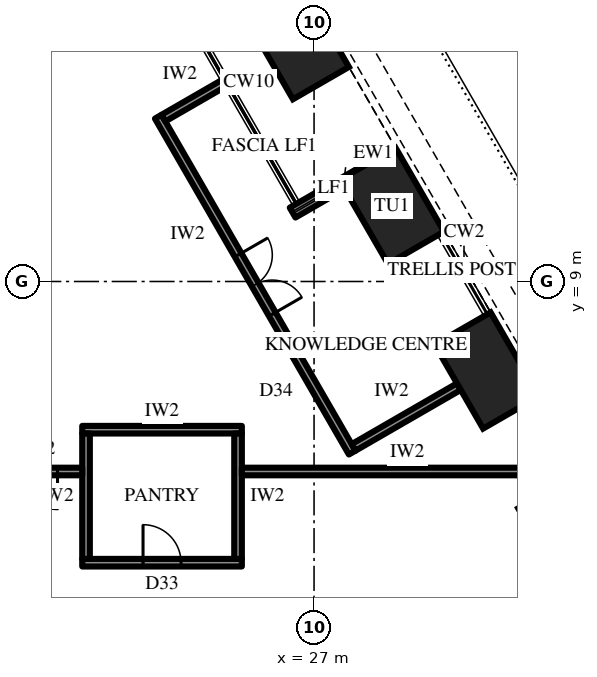
"""IFC4 building model, lengths in metres.
Left out: names, types, materials, properties, quantities, classifications, styles, units other than length and angle.
Written with IfcOpenShell. Run it as: python <this file> out.ifc"""

import sys

from ifc_helpers import new_model, si_unit, direction, frame, frame_2d, origin, origin_2d, place, context, subcontext, project, spatial, rectangle, extrude, element, fill, save


model = new_model("IFC4")
c1 = context("Model", 3, precision=1e-05, world=origin(), true_north=direction((0.0, 1.0)))
c2 = subcontext(c1, "Body", "Model", "MODEL_VIEW")
j1 = project(units=[si_unit("LENGTHUNIT", "METRE"), si_unit("PLANEANGLEUNIT", "RADIAN")], contexts=[c1])
p1 = place(None, origin())
s1 = spatial("IfcSite", under=j1, at=p1, CompositionType="ELEMENT")
p2 = place(p1, origin())
s2 = spatial("IfcBuilding", under=s1, at=p2, CompositionType="ELEMENT")
p3 = place(p2, frame((0.0, 0.0, 119.5)))
s3 = spatial("IfcBuildingStorey", under=s2, at=p3, CompositionType="ELEMENT", Elevation=119.5)
for number, where, z_axis, x_axis in (
    (1, (31.547, 6.658, 0.0), (0.0, 0.0, 1.0), (-0.5, 0.866, 0.0)),
    (2, (29.045, 10.992, 0.0), (0.0, 0.0, 1.0), (-0.5, 0.866, 0.0)),
    (3, (26.544, 15.325, 0.0), (0.0, 0.0, 1.0), (-0.5, 0.866, 0.0)),
):
    element("IfcColumn", number, at=place(p3, frame(where, z_axis=z_axis, x_axis=x_axis)), inside=s3, PredefinedType="COLUMN", context=c2, shape_type="SweptSolid", body=[
        extrude(rectangle(XDim=2.55, YDim=1.7, at=origin_2d()), origin(), (0.0, 0.0, 1.0), 4.2),
    ])
p4 = place(p3, frame((29.12, 12.363, 0.0), z_axis=(0.0, 0.0, 1.0), x_axis=(-0.86602952684, -0.49999285859, 0.0)))
e4 = element("IfcWall", 4, at=p4, inside=s3, PredefinedType="SOLIDWALL", context=c2, shape_type="SweptSolid", body=[
    extrude(rectangle(XDim=3.1, YDim=0.3, at=frame_2d((1.55, 0.0))), origin(), (0.0, 0.0, 1.0), 2.3),
])
p5 = place(p3, frame((28.003, 4.497, 0.0), z_axis=(0.0, 0.0, 1.0), x_axis=(-0.500005407604, 0.86602228168, 0.0)))
e5 = element("IfcWall", 5, at=p5, inside=s3, PredefinedType="PARTITIONING", context=c2, shape_type="SweptSolid", body=[
    extrude(rectangle(XDim=10.208, YDim=0.2, at=frame_2d((5.104, 0.0))), origin(), (0.0, 0.0, 1.0), 4.0),
])
p6 = place(p5, frame((4.204, 0.0, 0.0)))
e6 = element("IfcOpeningElement", 6, at=p6, cuts=e5, PredefinedType="OPENING", context=c2, shape_type="SweptSolid", body=[
    extrude(rectangle(XDim=1.8, YDim=2.4, at=frame_2d((0.9, 1.2))), frame((0.0, 0.11, 0.0), z_axis=(0.0, -1.0, 0.0), x_axis=(1.0, 0.0, 0.0)), (0.0, 0.0, 1.0), 0.22),
])
p7 = place(p3, frame((28.04, 4.633, 0.0), z_axis=(0.0, 0.0, 1.0), x_axis=(0.866008981251, 0.500028443584, 0.0)))
e7 = element("IfcWall", 7, at=p7, inside=s3, PredefinedType="PARTITIONING", context=c2, shape_type="SweptSolid", body=[
    extrude(rectangle(XDim=3.2, YDim=0.2, at=frame_2d((1.6, 0.0))), origin(), (0.0, 0.0, 1.0), 3.082),
])
p8 = place(p3, frame((23.036, 13.3, 0.0), z_axis=(0.0, 0.0, 1.0), x_axis=(0.866029456041, 0.49999298122, 0.0)))
e8 = element("IfcWall", 8, at=p8, inside=s3, PredefinedType="PARTITIONING", context=c2, shape_type="SweptSolid", body=[
    extrude(rectangle(XDim=1.901, YDim=0.2, at=frame_2d((0.95, 0.0))), origin(), (0.0, 0.0, 1.0), 4.0),
])
p9 = place(p3, frame((20.9, 1.6, 0.0), z_axis=(0.0, 0.0, 1.0), x_axis=(1.0, 0.0, 0.0)))
e9 = element("IfcWall", 9, at=p9, inside=s3, PredefinedType="PARTITIONING", context=c2, shape_type="SweptSolid", body=[
    extrude(rectangle(XDim=4.2, YDim=0.2, at=frame_2d((2.1, 0.0))), origin(), (0.0, 0.0, 1.0), 4.0),
])
p10 = place(p9, frame((1.6, 0.0, 0.0)))
e10 = element("IfcOpeningElement", 10, at=p10, cuts=e9, PredefinedType="OPENING", context=c2, shape_type="SweptSolid", body=[
    extrude(rectangle(XDim=1.0, YDim=2.2, at=frame_2d((0.5, 1.1))), frame((0.0, 0.11, 0.0), z_axis=(0.0, -1.0, 0.0), x_axis=(1.0, 0.0, 0.0)), (0.0, 0.0, 1.0), 0.22),
])
p11 = place(p3, frame((20.9, 5.1, 0.0), z_axis=(0.0, 0.0, 1.0), x_axis=(1.0, 0.0, 0.0)))
e11 = element("IfcWall", 11, at=p11, inside=s3, PredefinedType="PARTITIONING", context=c2, shape_type="SweptSolid", body=[
    extrude(rectangle(XDim=4.2, YDim=0.2, at=frame_2d((2.1, 0.0))), origin(), (0.0, 0.0, 1.0), 4.0),
])
for number, where, z_axis, x_axis in (
    (12, (21.0, 1.7, 0.0), (0.0, 0.0, 1.0), (0.0, 1.0, 0.0)),
    (13, (25.0, 1.7, 0.0), (0.0, 0.0, 1.0), (0.0, 1.0, 0.0)),
):
    element("IfcWall", number, at=place(p3, frame(where, z_axis=z_axis, x_axis=x_axis)), inside=s3, PredefinedType="PARTITIONING", context=c2, shape_type="SweptSolid", body=[
        extrude(rectangle(XDim=3.3, YDim=0.2, at=frame_2d((1.65, 0.0))), origin(), (0.0, 0.0, 1.0), 4.0),
    ])
p12 = place(p3, frame((18.6, 4.0, 0.0), z_axis=(0.0, 0.0, 1.0), x_axis=(1.0, 0.0, 0.0)))
e14 = element("IfcWall", 14, at=p12, inside=s3, PredefinedType="PARTITIONING", context=c2, shape_type="SweptSolid", body=[
    extrude(rectangle(XDim=2.3, YDim=0.2, at=frame_2d((1.15, 0.0))), origin(), (0.0, 0.0, 1.0), 4.0),
])
p13 = place(p12, frame((0.65, 0.0, 0.0)))
e15 = element("IfcOpeningElement", 15, at=p13, cuts=e14, PredefinedType="OPENING", context=c2, shape_type="SweptSolid", body=[
    extrude(rectangle(XDim=1.0, YDim=2.2, at=frame_2d((0.5, 1.1))), frame((0.0, 0.11, 0.0), z_axis=(0.0, -1.0, 0.0), x_axis=(1.0, 0.0, 0.0)), (0.0, 0.0, 1.0), 0.22),
])
p14 = place(p3, frame((25.1, 4.0, 0.0), z_axis=(0.0, 0.0, 1.0), x_axis=(1.0, 0.0, 0.0)))
e16 = element("IfcWall", 16, at=p14, inside=s3, PredefinedType="PARTITIONING", context=c2, shape_type="SweptSolid", body=[
    extrude(rectangle(XDim=8.709, YDim=0.2, at=frame_2d((4.355, 0.0))), origin(), (0.0, 0.0, 1.0), 4.0),
])
p15 = place(p6, frame((1.8, 0.0, 0.0), z_axis=(0.0, 0.0, 1.0), x_axis=(-1.0, 0.0, 0.0)))
e17 = element("IfcDoor", 17, at=p15, inside=s3, OperationType="DOUBLE_DOOR_SINGLE_SWING", PredefinedType="DOOR", context=c2, shape_type="SweptSolid", body=[
    extrude(rectangle(XDim=1.8, YDim=2.4, at=frame_2d((0.9, 1.2))), frame((0.0, 0.025, 0.0), z_axis=(0.0, -1.0, 0.0), x_axis=(1.0, 0.0, 0.0)), (0.0, 0.0, 1.0), 0.05),
])
fill(e6, e17)
p16 = place(p10, origin())
e18 = element("IfcDoor", 18, at=p16, inside=s3, OperationType="SINGLE_SWING_RIGHT", PredefinedType="DOOR", context=c2, shape_type="SweptSolid", body=[
    extrude(rectangle(XDim=1.0, YDim=2.2, at=frame_2d((0.5, 1.1))), frame((0.0, 0.025, 0.0), z_axis=(0.0, -1.0, 0.0), x_axis=(1.0, 0.0, 0.0)), (0.0, 0.0, 1.0), 0.05),
])
fill(e10, e18)
p17 = place(p13, frame((1.0, 0.0, 0.0), z_axis=(0.0, 0.0, 1.0), x_axis=(-1.0, 0.0, 0.0)))
e19 = element("IfcDoor", 19, at=p17, inside=s3, OperationType="SINGLE_SWING_RIGHT", PredefinedType="DOOR", context=c2, shape_type="SweptSolid", body=[
    extrude(rectangle(XDim=1.0, YDim=2.2, at=frame_2d((0.5, 1.1))), frame((0.0, 0.025, 0.0), z_axis=(0.0, -1.0, 0.0), x_axis=(1.0, 0.0, 0.0)), (0.0, 0.0, 1.0), 0.05),
])
fill(e15, e19)
save(model, sys.argv[1])
